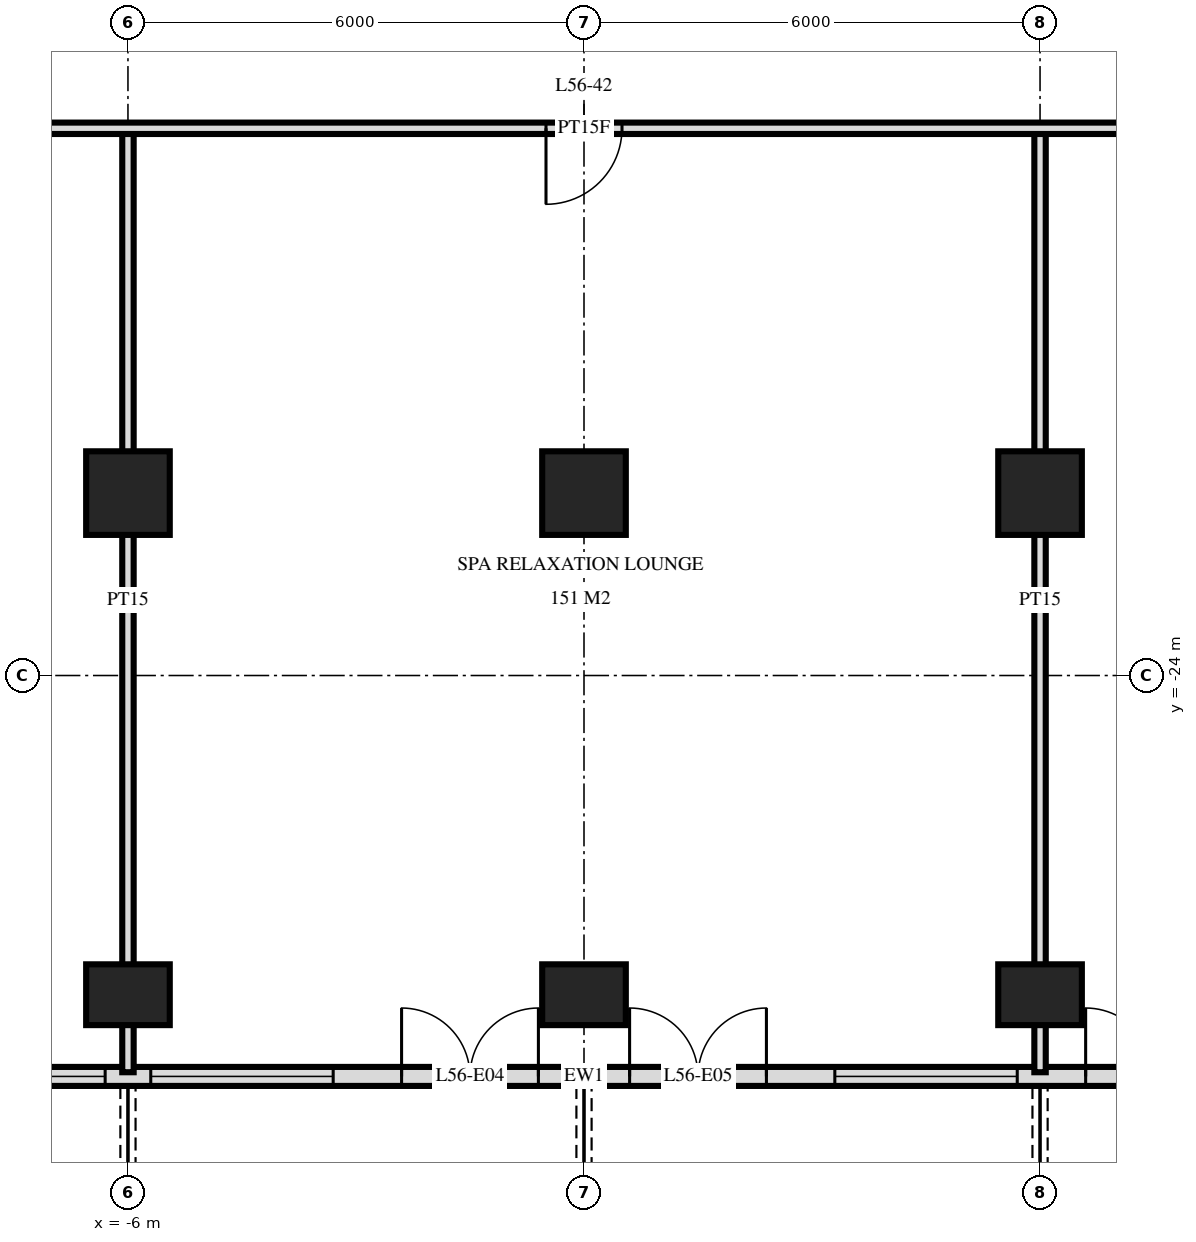
"""IFC4 building model, lengths in metres.
Left out: names, types, materials, properties, quantities, classifications, styles, units other than length and angle.
Written with IfcOpenShell. Run it as: python <this file> out.ifc"""

import sys

from ifc_helpers import new_model, si_unit, direction, frame, frame_2d, origin, origin_2d, place, context, subcontext, project, spatial, rectangle, extrude, element, fill, save


model = new_model("IFC4")
c1 = context("Model", 3, precision=1e-05, world=origin(), true_north=direction((0.0, 1.0)))
c2 = subcontext(c1, "Body", "Model", "MODEL_VIEW")
j1 = project(units=[si_unit("LENGTHUNIT", "METRE"), si_unit("PLANEANGLEUNIT", "RADIAN")], contexts=[c1])
p1 = place(None, origin())
s1 = spatial("IfcSite", under=j1, at=p1, CompositionType="ELEMENT")
p2 = place(p1, origin())
s2 = spatial("IfcBuilding", under=s1, at=p2, CompositionType="ELEMENT")
p3 = place(p2, frame((0.0, 0.0, 215.1)))
s3 = spatial("IfcBuildingStorey", under=s2, at=p3, CompositionType="ELEMENT", Elevation=215.1)
p4 = place(p3, frame((-6.0, -28.2, 0.0), z_axis=(0.0, 0.0, 1.0), x_axis=(1.0, 0.0, 0.0)))
e1 = element("IfcColumn", 1, at=p4, inside=s3, PredefinedType="COLUMN", context=c2, shape_type="SweptSolid", body=[
    extrude(rectangle(XDim=1.1, YDim=0.8, at=origin_2d()), origin(), (0.0, 0.0, 1.0), 3.5),
])
p5 = place(p3, frame((-6.0, -21.6, 0.0), z_axis=(0.0, 0.0, 1.0), x_axis=(1.0, 0.0, 0.0)))
e2 = element("IfcColumn", 2, at=p5, inside=s3, PredefinedType="COLUMN", context=c2, shape_type="SweptSolid", body=[
    extrude(rectangle(XDim=1.1, YDim=1.1, at=origin_2d()), origin(), (0.0, 0.0, 1.0), 3.5),
])
p6 = place(p3, frame((0.0, -28.2, 0.0), z_axis=(0.0, 0.0, 1.0), x_axis=(1.0, 0.0, 0.0)))
e3 = element("IfcColumn", 3, at=p6, inside=s3, PredefinedType="COLUMN", context=c2, shape_type="SweptSolid", body=[
    extrude(rectangle(XDim=1.1, YDim=0.8, at=origin_2d()), origin(), (0.0, 0.0, 1.0), 3.5),
])
p7 = place(p3, frame((0.0, -21.6, 0.0), z_axis=(0.0, 0.0, 1.0), x_axis=(1.0, 0.0, 0.0)))
e4 = element("IfcColumn", 4, at=p7, inside=s3, PredefinedType="COLUMN", context=c2, shape_type="SweptSolid", body=[
    extrude(rectangle(XDim=1.1, YDim=1.1, at=origin_2d()), origin(), (0.0, 0.0, 1.0), 3.5),
])
p8 = place(p3, frame((6.0, -28.2, 0.0), z_axis=(0.0, 0.0, 1.0), x_axis=(1.0, 0.0, 0.0)))
e5 = element("IfcColumn", 5, at=p8, inside=s3, PredefinedType="COLUMN", context=c2, shape_type="SweptSolid", body=[
    extrude(rectangle(XDim=1.1, YDim=0.8, at=origin_2d()), origin(), (0.0, 0.0, 1.0), 3.5),
])
p9 = place(p3, frame((6.0, -21.6, 0.0), z_axis=(0.0, 0.0, 1.0), x_axis=(1.0, 0.0, 0.0)))
e6 = element("IfcColumn", 6, at=p9, inside=s3, PredefinedType="COLUMN", context=c2, shape_type="SweptSolid", body=[
    extrude(rectangle(XDim=1.1, YDim=1.1, at=origin_2d()), origin(), (0.0, 0.0, 1.0), 3.5),
])
p10 = place(p3, frame((-22.475, -29.275, 0.0), z_axis=(0.0, 0.0, 1.0), x_axis=(1.0, 0.0, 0.0)))
e7 = element("IfcWall", 7, at=p10, inside=s3, PredefinedType="SOLIDWALL", context=c2, shape_type="SweptSolid", body=[
    extrude(rectangle(XDim=44.951, YDim=0.25, at=frame_2d((22.475, 0.0))), origin(), (0.0, 0.0, 1.0), 3.22),
])
p11 = place(p10, frame((0.575, 0.0, 0.0)))
e8 = element("IfcOpeningElement", 8, at=p11, cuts=e7, PredefinedType="OPENING", context=c2, shape_type="SweptSolid", body=[
    extrude(rectangle(XDim=1.8, YDim=2.4, at=frame_2d((0.9, 1.2))), frame((0.0, 0.135, 0.0), z_axis=(0.0, -1.0, 0.0), x_axis=(1.0, 0.0, 0.0)), (0.0, 0.0, 1.0), 0.27),
])
p12 = place(p10, frame((4.775, 0.0, 0.9)))
e9 = element("IfcOpeningElement", 9, at=p12, cuts=e7, PredefinedType="OPENING", context=c2, shape_type="SweptSolid", body=[
    extrude(rectangle(XDim=2.4, YDim=1.5, at=frame_2d((1.2, 0.75))), frame((0.0, 0.135, 0.0), z_axis=(0.0, -1.0, 0.0), x_axis=(1.0, 0.0, 0.0)), (0.0, 0.0, 1.0), 0.27),
])
p13 = place(p10, frame((8.075, 0.0, 0.0)))
e10 = element("IfcOpeningElement", 10, at=p13, cuts=e7, PredefinedType="OPENING", context=c2, shape_type="SweptSolid", body=[
    extrude(rectangle(XDim=1.8, YDim=2.4, at=frame_2d((0.9, 1.2))), frame((0.0, 0.135, 0.0), z_axis=(0.0, -1.0, 0.0), x_axis=(1.0, 0.0, 0.0)), (0.0, 0.0, 1.0), 0.27),
])
p14 = place(p10, frame((11.075, 0.0, 0.0)))
e11 = element("IfcOpeningElement", 11, at=p14, cuts=e7, PredefinedType="OPENING", context=c2, shape_type="SweptSolid", body=[
    extrude(rectangle(XDim=1.8, YDim=2.4, at=frame_2d((0.9, 1.2))), frame((0.0, 0.135, 0.0), z_axis=(0.0, -1.0, 0.0), x_axis=(1.0, 0.0, 0.0)), (0.0, 0.0, 1.0), 0.27),
])
p15 = place(p10, frame((13.775, 0.0, 0.9)))
e12 = element("IfcOpeningElement", 12, at=p15, cuts=e7, PredefinedType="OPENING", context=c2, shape_type="SweptSolid", body=[
    extrude(rectangle(XDim=2.4, YDim=1.5, at=frame_2d((1.2, 0.75))), frame((0.0, 0.135, 0.0), z_axis=(0.0, -1.0, 0.0), x_axis=(1.0, 0.0, 0.0)), (0.0, 0.0, 1.0), 0.27),
])
p16 = place(p10, frame((16.775, 0.0, 0.9)))
e13 = element("IfcOpeningElement", 13, at=p16, cuts=e7, PredefinedType="OPENING", context=c2, shape_type="SweptSolid", body=[
    extrude(rectangle(XDim=2.4, YDim=1.5, at=frame_2d((1.2, 0.75))), frame((0.0, 0.135, 0.0), z_axis=(0.0, -1.0, 0.0), x_axis=(1.0, 0.0, 0.0)), (0.0, 0.0, 1.0), 0.27),
])
p17 = place(p10, frame((20.075, 0.0, 0.0)))
e14 = element("IfcOpeningElement", 14, at=p17, cuts=e7, PredefinedType="OPENING", context=c2, shape_type="SweptSolid", body=[
    extrude(rectangle(XDim=1.8, YDim=2.4, at=frame_2d((0.9, 1.2))), frame((0.0, 0.135, 0.0), z_axis=(0.0, -1.0, 0.0), x_axis=(1.0, 0.0, 0.0)), (0.0, 0.0, 1.0), 0.27),
])
p18 = place(p10, frame((23.075, 0.0, 0.0)))
e15 = element("IfcOpeningElement", 15, at=p18, cuts=e7, PredefinedType="OPENING", context=c2, shape_type="SweptSolid", body=[
    extrude(rectangle(XDim=1.8, YDim=2.4, at=frame_2d((0.9, 1.2))), frame((0.0, 0.135, 0.0), z_axis=(0.0, -1.0, 0.0), x_axis=(1.0, 0.0, 0.0)), (0.0, 0.0, 1.0), 0.27),
])
p19 = place(p10, frame((25.775, 0.0, 0.9)))
e16 = element("IfcOpeningElement", 16, at=p19, cuts=e7, PredefinedType="OPENING", context=c2, shape_type="SweptSolid", body=[
    extrude(rectangle(XDim=2.4, YDim=1.5, at=frame_2d((1.2, 0.75))), frame((0.0, 0.135, 0.0), z_axis=(0.0, -1.0, 0.0), x_axis=(1.0, 0.0, 0.0)), (0.0, 0.0, 1.0), 0.27),
])
p20 = place(p10, frame((29.075, 0.0, 0.0)))
e17 = element("IfcOpeningElement", 17, at=p20, cuts=e7, PredefinedType="OPENING", context=c2, shape_type="SweptSolid", body=[
    extrude(rectangle(XDim=1.8, YDim=2.4, at=frame_2d((0.9, 1.2))), frame((0.0, 0.135, 0.0), z_axis=(0.0, -1.0, 0.0), x_axis=(1.0, 0.0, 0.0)), (0.0, 0.0, 1.0), 0.27),
])
p21 = place(p10, frame((31.775, 0.0, 0.9)))
e18 = element("IfcOpeningElement", 18, at=p21, cuts=e7, PredefinedType="OPENING", context=c2, shape_type="SweptSolid", body=[
    extrude(rectangle(XDim=2.4, YDim=1.5, at=frame_2d((1.2, 0.75))), frame((0.0, 0.135, 0.0), z_axis=(0.0, -1.0, 0.0), x_axis=(1.0, 0.0, 0.0)), (0.0, 0.0, 1.0), 0.27),
])
p22 = place(p10, frame((35.075, 0.0, 0.0)))
e19 = element("IfcOpeningElement", 19, at=p22, cuts=e7, PredefinedType="OPENING", context=c2, shape_type="SweptSolid", body=[
    extrude(rectangle(XDim=1.8, YDim=2.4, at=frame_2d((0.9, 1.2))), frame((0.0, 0.135, 0.0), z_axis=(0.0, -1.0, 0.0), x_axis=(1.0, 0.0, 0.0)), (0.0, 0.0, 1.0), 0.27),
])
p23 = place(p10, frame((41.075, 0.0, 0.0)))
e20 = element("IfcOpeningElement", 20, at=p23, cuts=e7, PredefinedType="OPENING", context=c2, shape_type="SweptSolid", body=[
    extrude(rectangle(XDim=1.8, YDim=2.4, at=frame_2d((0.9, 1.2))), frame((0.0, 0.135, 0.0), z_axis=(0.0, -1.0, 0.0), x_axis=(1.0, 0.0, 0.0)), (0.0, 0.0, 1.0), 0.27),
])
for number, where, z_axis, x_axis in (
    (21, (6.0, -29.22, 0.0), (0.0, 0.0, 1.0), (0.0, 1.0, 0.0)),
    (22, (-6.0, -29.22, 0.0), (0.0, 0.0, 1.0), (0.0, 1.0, 0.0)),
):
    element("IfcWall", number, at=place(p3, frame(where, z_axis=z_axis, x_axis=x_axis)), inside=s3, PredefinedType="PARTITIONING", context=c2, shape_type="SweptSolid", body=[
        extrude(rectangle(XDim=12.42, YDim=0.15, at=frame_2d((6.21, 0.0))), origin(), (0.0, 0.0, 1.0), 3.22),
    ])
p24 = place(p3, frame((-26.82, -16.8, 0.0), z_axis=(0.0, 0.0, 1.0), x_axis=(1.0, 0.0, 0.0)))
e23 = element("IfcWall", 23, at=p24, inside=s3, PredefinedType="PARTITIONING", context=c2, shape_type="SweptSolid", body=[
    extrude(rectangle(XDim=53.64, YDim=0.15, at=frame_2d((26.82, 0.0))), origin(), (0.0, 0.0, 1.0), 3.22),
])
p25 = place(p24, frame((11.17, 0.0, 0.0)))
e24 = element("IfcOpeningElement", 24, at=p25, cuts=e23, PredefinedType="OPENING", context=c2, shape_type="SweptSolid", body=[
    extrude(rectangle(XDim=1.0, YDim=2.1, at=frame_2d((0.5, 1.05))), frame((0.0, 0.085, 0.0), z_axis=(0.0, -1.0, 0.0), x_axis=(1.0, 0.0, 0.0)), (0.0, 0.0, 1.0), 0.17),
])
p26 = place(p24, frame((3.22, 0.0, 0.0)))
e25 = element("IfcOpeningElement", 25, at=p26, cuts=e23, PredefinedType="OPENING", context=c2, shape_type="SweptSolid", body=[
    extrude(rectangle(XDim=1.0, YDim=2.1, at=frame_2d((0.5, 1.05))), frame((0.0, 0.085, 0.0), z_axis=(0.0, -1.0, 0.0), x_axis=(1.0, 0.0, 0.0)), (0.0, 0.0, 1.0), 0.17),
])
p27 = place(p24, frame((5.02, 0.0, 0.0)))
e26 = element("IfcOpeningElement", 26, at=p27, cuts=e23, PredefinedType="OPENING", context=c2, shape_type="SweptSolid", body=[
    extrude(rectangle(XDim=1.0, YDim=2.1, at=frame_2d((0.5, 1.05))), frame((0.0, 0.085, 0.0), z_axis=(0.0, -1.0, 0.0), x_axis=(1.0, 0.0, 0.0)), (0.0, 0.0, 1.0), 0.17),
])
p28 = place(p24, frame((47.72, 0.0, 0.0)))
e27 = element("IfcOpeningElement", 27, at=p28, cuts=e23, PredefinedType="OPENING", context=c2, shape_type="SweptSolid", body=[
    extrude(rectangle(XDim=1.0, YDim=2.1, at=frame_2d((0.5, 1.05))), frame((0.0, 0.085, 0.0), z_axis=(0.0, -1.0, 0.0), x_axis=(1.0, 0.0, 0.0)), (0.0, 0.0, 1.0), 0.17),
])
p29 = place(p24, frame((51.04, 0.0, 0.0)))
e28 = element("IfcOpeningElement", 28, at=p29, cuts=e23, PredefinedType="OPENING", context=c2, shape_type="SweptSolid", body=[
    extrude(rectangle(XDim=1.0, YDim=2.1, at=frame_2d((0.5, 1.05))), frame((0.0, 0.085, 0.0), z_axis=(0.0, -1.0, 0.0), x_axis=(1.0, 0.0, 0.0)), (0.0, 0.0, 1.0), 0.17),
])
p30 = place(p24, frame((17.32, 0.0, 0.0)))
e29 = element("IfcOpeningElement", 29, at=p30, cuts=e23, PredefinedType="OPENING", context=c2, shape_type="SweptSolid", body=[
    extrude(rectangle(XDim=1.0, YDim=2.1, at=frame_2d((0.5, 1.05))), frame((0.0, 0.085, 0.0), z_axis=(0.0, -1.0, 0.0), x_axis=(1.0, 0.0, 0.0)), (0.0, 0.0, 1.0), 0.17),
])
p31 = place(p24, frame((26.32, 0.0, 0.0)))
e30 = element("IfcOpeningElement", 30, at=p31, cuts=e23, PredefinedType="OPENING", context=c2, shape_type="SweptSolid", body=[
    extrude(rectangle(XDim=1.0, YDim=2.1, at=frame_2d((0.5, 1.05))), frame((0.0, 0.085, 0.0), z_axis=(0.0, -1.0, 0.0), x_axis=(1.0, 0.0, 0.0)), (0.0, 0.0, 1.0), 0.17),
])
p32 = place(p24, frame((35.32, 0.0, 0.0)))
e31 = element("IfcOpeningElement", 31, at=p32, cuts=e23, PredefinedType="OPENING", context=c2, shape_type="SweptSolid", body=[
    extrude(rectangle(XDim=1.0, YDim=2.1, at=frame_2d((0.5, 1.05))), frame((0.0, 0.085, 0.0), z_axis=(0.0, -1.0, 0.0), x_axis=(1.0, 0.0, 0.0)), (0.0, 0.0, 1.0), 0.17),
])
p33 = place(p15, origin())
e32 = element("IfcWindow", 32, at=p33, inside=s3, PartitioningType="SINGLE_PANEL", PredefinedType="WINDOW", context=c2, shape_type="SweptSolid", body=[
    extrude(rectangle(XDim=2.4, YDim=1.5, at=frame_2d((1.2, 0.75))), frame((0.0, 0.03, 0.0), z_axis=(0.0, -1.0, 0.0), x_axis=(1.0, 0.0, 0.0)), (0.0, 0.0, 1.0), 0.06),
])
fill(e12, e32)
p34 = place(p16, origin())
e33 = element("IfcWindow", 33, at=p34, inside=s3, PartitioningType="SINGLE_PANEL", PredefinedType="WINDOW", context=c2, shape_type="SweptSolid", body=[
    extrude(rectangle(XDim=2.4, YDim=1.5, at=frame_2d((1.2, 0.75))), frame((0.0, 0.03, 0.0), z_axis=(0.0, -1.0, 0.0), x_axis=(1.0, 0.0, 0.0)), (0.0, 0.0, 1.0), 0.06),
])
fill(e13, e33)
p35 = place(p17, origin())
e34 = element("IfcDoor", 34, at=p35, inside=s3, OperationType="DOUBLE_DOOR_SINGLE_SWING", PredefinedType="DOOR", context=c2, shape_type="SweptSolid", body=[
    extrude(rectangle(XDim=1.8, YDim=2.4, at=frame_2d((0.9, 1.2))), frame((0.0, 0.025, 0.0), z_axis=(0.0, -1.0, 0.0), x_axis=(1.0, 0.0, 0.0)), (0.0, 0.0, 1.0), 0.05),
])
fill(e14, e34)
p36 = place(p18, origin())
e35 = element("IfcDoor", 35, at=p36, inside=s3, OperationType="DOUBLE_DOOR_SINGLE_SWING", PredefinedType="DOOR", context=c2, shape_type="SweptSolid", body=[
    extrude(rectangle(XDim=1.8, YDim=2.4, at=frame_2d((0.9, 1.2))), frame((0.0, 0.025, 0.0), z_axis=(0.0, -1.0, 0.0), x_axis=(1.0, 0.0, 0.0)), (0.0, 0.0, 1.0), 0.05),
])
fill(e15, e35)
p37 = place(p19, origin())
e36 = element("IfcWindow", 36, at=p37, inside=s3, PartitioningType="SINGLE_PANEL", PredefinedType="WINDOW", context=c2, shape_type="SweptSolid", body=[
    extrude(rectangle(XDim=2.4, YDim=1.5, at=frame_2d((1.2, 0.75))), frame((0.0, 0.03, 0.0), z_axis=(0.0, -1.0, 0.0), x_axis=(1.0, 0.0, 0.0)), (0.0, 0.0, 1.0), 0.06),
])
fill(e16, e36)
p38 = place(p20, origin())
e37 = element("IfcDoor", 37, at=p38, inside=s3, OperationType="DOUBLE_DOOR_SINGLE_SWING", PredefinedType="DOOR", context=c2, shape_type="SweptSolid", body=[
    extrude(rectangle(XDim=1.8, YDim=2.4, at=frame_2d((0.9, 1.2))), frame((0.0, 0.025, 0.0), z_axis=(0.0, -1.0, 0.0), x_axis=(1.0, 0.0, 0.0)), (0.0, 0.0, 1.0), 0.05),
])
fill(e17, e37)
p39 = place(p31, frame((0.5, 0.0, 0.0), z_axis=(0.0, 0.0, 1.0), x_axis=(-1.0, 0.0, 0.0)))
e38 = element("IfcDoor", 38, at=p39, inside=s3, OperationType="SINGLE_SWING_LEFT", PredefinedType="DOOR", context=c2, shape_type="SweptSolid", body=[
    extrude(rectangle(XDim=1.0, YDim=2.1, at=frame_2d((0.0, 1.05))), frame((0.0, -0.025, 0.0), z_axis=(0.0, 1.0, 0.0), x_axis=(-1.0, 0.0, 0.0)), (0.0, 0.0, 1.0), 0.05),
])
fill(e30, e38)
save(model, sys.argv[1])
